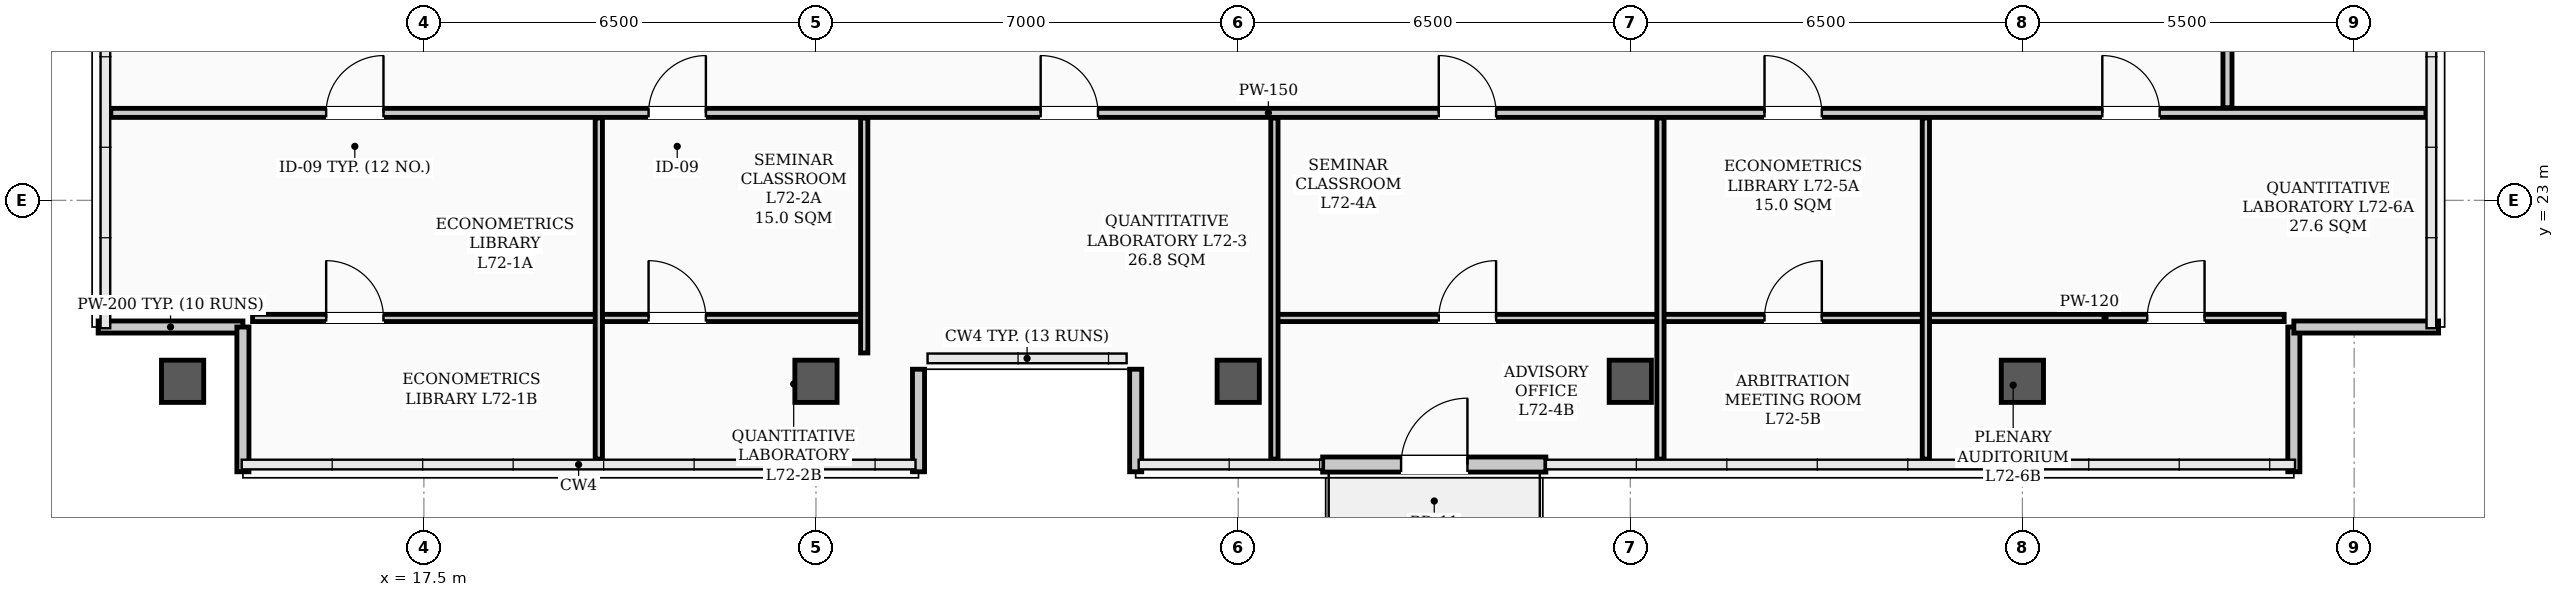
"""IFC4 building model, lengths in metres.
Left out: names, types, materials, properties, quantities, classifications, styles, units other than length and angle.
Written with IfcOpenShell. Run it as: python <this file> out.ifc"""

import sys

from ifc_helpers import new_model, si_unit, direction, frame, frame_2d, origin, origin_2d, place, context, subcontext, project, spatial, rectangle, hollow_rectangle, extrude, element, fill, save


model = new_model("IFC4")
c1 = context("Model", 3, precision=1e-05, world=origin(), true_north=direction((0.0, 1.0)))
c2 = subcontext(c1, "Body", "Model", "MODEL_VIEW")
j1 = project(units=[si_unit("LENGTHUNIT", "METRE"), si_unit("PLANEANGLEUNIT", "RADIAN")], contexts=[c1])
p1 = place(None, origin())
s1 = spatial("IfcSite", under=j1, at=p1, CompositionType="ELEMENT")
p2 = place(p1, origin())
s2 = spatial("IfcBuilding", under=s1, at=p2, CompositionType="ELEMENT")
p3 = place(p2, frame((0.0, 0.0, 289.1)))
s3 = spatial("IfcBuildingStorey", under=s2, at=p3, CompositionType="ELEMENT", Elevation=289.1)
for number, where, z_axis, x_axis in (
    (1, (13.5, 20.0, 0.0), (0.0, 0.0, 1.0), (1.0, 0.0, 0.0)),
    (2, (24.0, 20.0, 0.0), (0.0, 0.0, 1.0), (1.0, 0.0, 0.0)),
    (3, (31.0, 20.0, 0.0), (0.0, 0.0, 1.0), (1.0, 0.0, 0.0)),
    (4, (37.5, 20.0, 0.0), (0.0, 0.0, 1.0), (1.0, 0.0, 0.0)),
    (5, (44.0, 20.0, 0.0), (0.0, 0.0, 1.0), (1.0, 0.0, 0.0)),
):
    element("IfcColumn", number, at=place(p3, frame(where, z_axis=z_axis, x_axis=x_axis)), inside=s3, PredefinedType="COLUMN", context=c2, shape_type="SweptSolid", body=[
        extrude(hollow_rectangle(XDim=0.7, YDim=0.7, WallThickness=0.028, InnerFilletRadius=0.014, OuterFilletRadius=0.042, at=origin_2d()), origin(), (0.0, 0.0, 1.0), 3.9),
    ])
for number, where, z_axis, x_axis in (
    (6, (12.1, 20.9, 0.0), (0.0, 0.0, 1.0), (1.0, 0.0, 0.0)),
    (7, (14.5, 20.9, 0.0), (0.0, 0.0, 1.0), (0.0, -1.0, 0.0)),
    (8, (48.5, 18.5, 0.0), (0.0, 0.0, 1.0), (0.0, 1.0, 0.0)),
    (9, (48.5, 20.9, 0.0), (0.0, 0.0, 1.0), (1.0, 0.0, 0.0)),
):
    element("IfcWall", number, at=place(p3, frame(where, z_axis=z_axis, x_axis=x_axis)), inside=s3, PredefinedType="PARAPET", context=c2, shape_type="SweptSolid", body=[
        extrude(rectangle(XDim=2.4, YDim=0.2, at=frame_2d((1.2, 0.0))), origin(), (0.0, 0.0, 1.0), 1.2),
    ])
for number, where, z_axis, x_axis in (
    (10, (25.7, 18.5, 0.0), (0.0, 0.0, 1.0), (0.0, 1.0, 0.0)),
    (11, (29.3, 20.2, 0.0), (0.0, 0.0, 1.0), (0.0, -1.0, 0.0)),
):
    element("IfcWall", number, at=place(p3, frame(where, z_axis=z_axis, x_axis=x_axis)), inside=s3, PredefinedType="PARAPET", context=c2, shape_type="SweptSolid", body=[
        extrude(rectangle(XDim=1.7, YDim=0.2, at=frame_2d((0.85, 0.0))), origin(), (0.0, 0.0, 1.0), 1.2),
    ])
p4 = place(p3, frame((32.4, 18.62, 0.0), z_axis=(0.0, 0.0, 1.0), x_axis=(1.0, 0.0, 0.0)))
e12 = element("IfcWall", 12, at=p4, inside=s3, PredefinedType="STANDARD", context=c2, shape_type="SweptSolid", body=[
    extrude(rectangle(XDim=3.7, YDim=0.25, at=frame_2d((1.85, 0.0))), origin(), (0.0, 0.0, 1.0), 3.18),
])
p5 = place(p4, frame((1.3, 0.0, 0.0)))
e13 = element("IfcOpeningElement", 13, at=p5, cuts=e12, PredefinedType="OPENING", context=c2, shape_type="SweptSolid", body=[
    extrude(rectangle(XDim=1.1, YDim=2.2, at=frame_2d((0.55, 1.1))), frame((0.0, 0.135, 0.0), z_axis=(0.0, -1.0, 0.0), x_axis=(1.0, 0.0, 0.0)), (0.0, 0.0, 1.0), 0.27),
])
p6 = place(p3, frame((12.31, 24.45, 0.0), z_axis=(0.0, 0.0, 1.0), x_axis=(1.0, 0.0, 0.0)))
e14 = element("IfcWall", 14, at=p6, inside=s3, PredefinedType="PARTITIONING", context=c2, shape_type="SweptSolid", body=[
    extrude(rectangle(XDim=38.38, YDim=0.15, at=frame_2d((19.19, 0.0))), origin(), (0.0, 0.0, 1.0), 3.2),
])
p7 = place(p6, frame((3.57, 0.0, 0.0)))
e15 = element("IfcOpeningElement", 15, at=p7, cuts=e14, PredefinedType="OPENING", context=c2, shape_type="SweptSolid", body=[
    extrude(rectangle(XDim=0.95, YDim=2.08, at=frame_2d((0.475, 1.04))), frame((0.0, 0.085, 0.0), z_axis=(0.0, -1.0, 0.0), x_axis=(1.0, 0.0, 0.0)), (0.0, 0.0, 1.0), 0.17),
])
p8 = place(p6, frame((8.915, 0.0, 0.0)))
e16 = element("IfcOpeningElement", 16, at=p8, cuts=e14, PredefinedType="OPENING", context=c2, shape_type="SweptSolid", body=[
    extrude(rectangle(XDim=0.95, YDim=2.08, at=frame_2d((0.475, 1.04))), frame((0.0, 0.085, 0.0), z_axis=(0.0, -1.0, 0.0), x_axis=(1.0, 0.0, 0.0)), (0.0, 0.0, 1.0), 0.17),
])
p9 = place(p6, frame((15.415, 0.0, 0.0)))
e17 = element("IfcOpeningElement", 17, at=p9, cuts=e14, PredefinedType="OPENING", context=c2, shape_type="SweptSolid", body=[
    extrude(rectangle(XDim=0.95, YDim=2.08, at=frame_2d((0.475, 1.04))), frame((0.0, 0.085, 0.0), z_axis=(0.0, -1.0, 0.0), x_axis=(1.0, 0.0, 0.0)), (0.0, 0.0, 1.0), 0.17),
])
p10 = place(p6, frame((22.015, 0.0, 0.0)))
e18 = element("IfcOpeningElement", 18, at=p10, cuts=e14, PredefinedType="OPENING", context=c2, shape_type="SweptSolid", body=[
    extrude(rectangle(XDim=0.95, YDim=2.08, at=frame_2d((0.475, 1.04))), frame((0.0, 0.085, 0.0), z_axis=(0.0, -1.0, 0.0), x_axis=(1.0, 0.0, 0.0)), (0.0, 0.0, 1.0), 0.17),
])
p11 = place(p6, frame((27.415, 0.0, 0.0)))
e19 = element("IfcOpeningElement", 19, at=p11, cuts=e14, PredefinedType="OPENING", context=c2, shape_type="SweptSolid", body=[
    extrude(rectangle(XDim=0.95, YDim=2.08, at=frame_2d((0.475, 1.04))), frame((0.0, 0.085, 0.0), z_axis=(0.0, -1.0, 0.0), x_axis=(1.0, 0.0, 0.0)), (0.0, 0.0, 1.0), 0.17),
])
p12 = place(p6, frame((33.015, 0.0, 0.0)))
e20 = element("IfcOpeningElement", 20, at=p12, cuts=e14, PredefinedType="OPENING", context=c2, shape_type="SweptSolid", body=[
    extrude(rectangle(XDim=0.95, YDim=2.08, at=frame_2d((0.475, 1.04))), frame((0.0, 0.085, 0.0), z_axis=(0.0, -1.0, 0.0), x_axis=(1.0, 0.0, 0.0)), (0.0, 0.0, 1.0), 0.17),
])
p13 = place(p3, frame((14.66, 21.05, 0.0), z_axis=(0.0, 0.0, 1.0), x_axis=(1.0, 0.0, 0.0)))
e21 = element("IfcWall", 21, at=p13, inside=s3, PredefinedType="PARTITIONING", context=c2, shape_type="SweptSolid", body=[
    extrude(rectangle(XDim=5.74, YDim=0.12, at=frame_2d((2.87, 0.0))), origin(), (0.0, 0.0, 1.0), 3.72),
])
p14 = place(p13, frame((1.22, 0.0, 0.0)))
e22 = element("IfcOpeningElement", 22, at=p14, cuts=e21, PredefinedType="OPENING", context=c2, shape_type="SweptSolid", body=[
    extrude(rectangle(XDim=0.95, YDim=2.08, at=frame_2d((0.475, 1.04))), frame((0.0, 0.07, 0.0), z_axis=(0.0, -1.0, 0.0), x_axis=(1.0, 0.0, 0.0)), (0.0, 0.0, 1.0), 0.14),
])
p15 = place(p3, frame((20.4, 21.05, 0.0), z_axis=(0.0, 0.0, 1.0), x_axis=(1.0, 0.0, 0.0)))
e23 = element("IfcWall", 23, at=p15, inside=s3, PredefinedType="PARTITIONING", context=c2, shape_type="SweptSolid", body=[
    extrude(rectangle(XDim=4.4, YDim=0.12, at=frame_2d((2.2, 0.0))), origin(), (0.0, 0.0, 1.0), 3.2),
])
p16 = place(p15, frame((0.825, 0.0, 0.0)))
e24 = element("IfcOpeningElement", 24, at=p16, cuts=e23, PredefinedType="OPENING", context=c2, shape_type="SweptSolid", body=[
    extrude(rectangle(XDim=0.95, YDim=2.08, at=frame_2d((0.475, 1.04))), frame((0.0, 0.07, 0.0), z_axis=(0.0, -1.0, 0.0), x_axis=(1.0, 0.0, 0.0)), (0.0, 0.0, 1.0), 0.14),
])
p17 = place(p3, frame((31.6, 21.05, 0.0), z_axis=(0.0, 0.0, 1.0), x_axis=(1.0, 0.0, 0.0)))
e25 = element("IfcWall", 25, at=p17, inside=s3, PredefinedType="PARTITIONING", context=c2, shape_type="SweptSolid", body=[
    extrude(rectangle(XDim=6.4, YDim=0.12, at=frame_2d((3.2, 0.0))), origin(), (0.0, 0.0, 1.0), 3.2),
])
p18 = place(p17, frame((2.725, 0.0, 0.0)))
e26 = element("IfcOpeningElement", 26, at=p18, cuts=e25, PredefinedType="OPENING", context=c2, shape_type="SweptSolid", body=[
    extrude(rectangle(XDim=0.95, YDim=2.08, at=frame_2d((0.475, 1.04))), frame((0.0, 0.07, 0.0), z_axis=(0.0, -1.0, 0.0), x_axis=(1.0, 0.0, 0.0)), (0.0, 0.0, 1.0), 0.14),
])
p19 = place(p3, frame((38.0, 21.05, 0.0), z_axis=(0.0, 0.0, 1.0), x_axis=(1.0, 0.0, 0.0)))
e27 = element("IfcWall", 27, at=p19, inside=s3, PredefinedType="PARTITIONING", context=c2, shape_type="SweptSolid", body=[
    extrude(rectangle(XDim=4.4, YDim=0.12, at=frame_2d((2.2, 0.0))), origin(), (0.0, 0.0, 1.0), 3.2),
])
p20 = place(p19, frame((1.725, 0.0, 0.0)))
e28 = element("IfcOpeningElement", 28, at=p20, cuts=e27, PredefinedType="OPENING", context=c2, shape_type="SweptSolid", body=[
    extrude(rectangle(XDim=0.95, YDim=2.08, at=frame_2d((0.475, 1.04))), frame((0.0, 0.07, 0.0), z_axis=(0.0, -1.0, 0.0), x_axis=(1.0, 0.0, 0.0)), (0.0, 0.0, 1.0), 0.14),
])
p21 = place(p3, frame((42.4, 21.05, 0.0), z_axis=(0.0, 0.0, 1.0), x_axis=(1.0, 0.0, 0.0)))
e29 = element("IfcWall", 29, at=p21, inside=s3, PredefinedType="PARTITIONING", context=c2, shape_type="SweptSolid", body=[
    extrude(rectangle(XDim=5.94, YDim=0.12, at=frame_2d((2.97, 0.0))), origin(), (0.0, 0.0, 1.0), 3.2),
])
p22 = place(p21, frame((3.67, 0.0, 0.0)))
e30 = element("IfcOpeningElement", 30, at=p22, cuts=e29, PredefinedType="OPENING", context=c2, shape_type="SweptSolid", body=[
    extrude(rectangle(XDim=0.95, YDim=2.08, at=frame_2d((0.475, 1.04))), frame((0.0, 0.07, 0.0), z_axis=(0.0, -1.0, 0.0), x_axis=(1.0, 0.0, 0.0)), (0.0, 0.0, 1.0), 0.14),
])
p23 = place(p3, frame((47.4, 24.535, 0.0), z_axis=(0.0, 0.0, 1.0), x_axis=(0.0, 1.0, 0.0)))
e31 = element("IfcWall", 31, at=p23, inside=s3, PredefinedType="PARTITIONING", context=c2, shape_type="SweptSolid", body=[
    extrude(rectangle(XDim=17.13, YDim=0.15, at=frame_2d((8.565, 0.0))), origin(), (0.0, 0.0, 1.0), 3.1),
])
p24 = place(p23, frame((8.09, 0.0, 0.0)))
e32 = element("IfcOpeningElement", 32, at=p24, cuts=e31, PredefinedType="OPENING", context=c2, shape_type="SweptSolid", body=[
    extrude(rectangle(XDim=0.95, YDim=2.08, at=frame_2d((0.475, 1.04))), frame((0.0, 0.085, 0.0), z_axis=(0.0, -1.0, 0.0), x_axis=(1.0, 0.0, 0.0)), (0.0, 0.0, 1.0), 0.17),
])
p25 = place(p3, frame((20.4, 18.71, 0.0), z_axis=(0.0, 0.0, 1.0), x_axis=(0.0, 1.0, 0.0)))
e33 = element("IfcWall", 33, at=p25, inside=s3, PredefinedType="PARTITIONING", context=c2, shape_type="SweptSolid", body=[
    extrude(rectangle(XDim=5.655, YDim=0.12, at=frame_2d((2.828, 0.0))), origin(), (0.0, 0.0, 1.0), 3.72),
])
p26 = place(p3, frame((24.8, 20.47, 0.0), z_axis=(0.0, 0.0, 1.0), x_axis=(0.0, 1.0, 0.0)))
e34 = element("IfcWall", 34, at=p26, inside=s3, PredefinedType="PARTITIONING", context=c2, shape_type="SweptSolid", body=[
    extrude(rectangle(XDim=3.895, YDim=0.12, at=frame_2d((1.948, 0.0))), origin(), (0.0, 0.0, 1.0), 3.1),
])
for number, where, z_axis, x_axis in (
    (35, (31.6, 18.71, 0.0), (0.0, 0.0, 1.0), (0.0, 1.0, 0.0)),
    (36, (38.0, 18.71, 0.0), (0.0, 0.0, 1.0), (0.0, 1.0, 0.0)),
    (37, (42.4, 18.71, 0.0), (0.0, 0.0, 1.0), (0.0, 1.0, 0.0)),
):
    element("IfcWall", number, at=place(p3, frame(where, z_axis=z_axis, x_axis=x_axis)), inside=s3, PredefinedType="PARTITIONING", context=c2, shape_type="SweptSolid", body=[
        extrude(rectangle(XDim=5.655, YDim=0.12, at=frame_2d((2.828, 0.0))), origin(), (0.0, 0.0, 1.0), 3.1),
    ])
p27 = place(p5, origin())
e38 = element("IfcDoor", 38, at=p27, inside=s3, OperationType="SINGLE_SWING_RIGHT", PredefinedType="DOOR", context=c2, shape_type="SweptSolid", body=[
    extrude(rectangle(XDim=1.1, YDim=2.2, at=frame_2d((0.55, 1.1))), frame((0.0, 0.025, 0.0), z_axis=(0.0, -1.0, 0.0), x_axis=(1.0, 0.0, 0.0)), (0.0, 0.0, 1.0), 0.05),
])
fill(e13, e38)
p28 = place(p14, origin())
e39 = element("IfcDoor", 39, at=p28, inside=s3, OperationType="SINGLE_SWING_LEFT", PredefinedType="DOOR", context=c2, shape_type="SweptSolid", body=[
    extrude(rectangle(XDim=0.95, YDim=2.08, at=frame_2d((0.475, 1.04))), frame((0.0, 0.025, 0.0), z_axis=(0.0, -1.0, 0.0), x_axis=(1.0, 0.0, 0.0)), (0.0, 0.0, 1.0), 0.05),
])
fill(e22, e39)
p29 = place(p7, origin())
e40 = element("IfcDoor", 40, at=p29, inside=s3, OperationType="SINGLE_SWING_RIGHT", PredefinedType="DOOR", context=c2, shape_type="SweptSolid", body=[
    extrude(rectangle(XDim=0.95, YDim=2.08, at=frame_2d((0.475, 1.04))), frame((0.0, 0.025, 0.0), z_axis=(0.0, -1.0, 0.0), x_axis=(1.0, 0.0, 0.0)), (0.0, 0.0, 1.0), 0.05),
])
fill(e15, e40)
p30 = place(p16, origin())
e41 = element("IfcDoor", 41, at=p30, inside=s3, OperationType="SINGLE_SWING_LEFT", PredefinedType="DOOR", context=c2, shape_type="SweptSolid", body=[
    extrude(rectangle(XDim=0.95, YDim=2.08, at=frame_2d((0.475, 1.04))), frame((0.0, 0.025, 0.0), z_axis=(0.0, -1.0, 0.0), x_axis=(1.0, 0.0, 0.0)), (0.0, 0.0, 1.0), 0.05),
])
fill(e24, e41)
p31 = place(p8, origin())
e42 = element("IfcDoor", 42, at=p31, inside=s3, OperationType="SINGLE_SWING_RIGHT", PredefinedType="DOOR", context=c2, shape_type="SweptSolid", body=[
    extrude(rectangle(XDim=0.95, YDim=2.08, at=frame_2d((0.475, 1.04))), frame((0.0, 0.025, 0.0), z_axis=(0.0, -1.0, 0.0), x_axis=(1.0, 0.0, 0.0)), (0.0, 0.0, 1.0), 0.05),
])
fill(e16, e42)
p32 = place(p9, origin())
e43 = element("IfcDoor", 43, at=p32, inside=s3, OperationType="SINGLE_SWING_LEFT", PredefinedType="DOOR", context=c2, shape_type="SweptSolid", body=[
    extrude(rectangle(XDim=0.95, YDim=2.08, at=frame_2d((0.475, 1.04))), frame((0.0, 0.025, 0.0), z_axis=(0.0, -1.0, 0.0), x_axis=(1.0, 0.0, 0.0)), (0.0, 0.0, 1.0), 0.05),
])
fill(e17, e43)
p33 = place(p18, origin())
e44 = element("IfcDoor", 44, at=p33, inside=s3, OperationType="SINGLE_SWING_RIGHT", PredefinedType="DOOR", context=c2, shape_type="SweptSolid", body=[
    extrude(rectangle(XDim=0.95, YDim=2.08, at=frame_2d((0.475, 1.04))), frame((0.0, 0.025, 0.0), z_axis=(0.0, -1.0, 0.0), x_axis=(1.0, 0.0, 0.0)), (0.0, 0.0, 1.0), 0.05),
])
fill(e26, e44)
p34 = place(p10, origin())
e45 = element("IfcDoor", 45, at=p34, inside=s3, OperationType="SINGLE_SWING_LEFT", PredefinedType="DOOR", context=c2, shape_type="SweptSolid", body=[
    extrude(rectangle(XDim=0.95, YDim=2.08, at=frame_2d((0.475, 1.04))), frame((0.0, 0.025, 0.0), z_axis=(0.0, -1.0, 0.0), x_axis=(1.0, 0.0, 0.0)), (0.0, 0.0, 1.0), 0.05),
])
fill(e18, e45)
p35 = place(p20, origin())
e46 = element("IfcDoor", 46, at=p35, inside=s3, OperationType="SINGLE_SWING_RIGHT", PredefinedType="DOOR", context=c2, shape_type="SweptSolid", body=[
    extrude(rectangle(XDim=0.95, YDim=2.08, at=frame_2d((0.475, 1.04))), frame((0.0, 0.025, 0.0), z_axis=(0.0, -1.0, 0.0), x_axis=(1.0, 0.0, 0.0)), (0.0, 0.0, 1.0), 0.05),
])
fill(e28, e46)
p36 = place(p11, origin())
e47 = element("IfcDoor", 47, at=p36, inside=s3, OperationType="SINGLE_SWING_LEFT", PredefinedType="DOOR", context=c2, shape_type="SweptSolid", body=[
    extrude(rectangle(XDim=0.95, YDim=2.08, at=frame_2d((0.475, 1.04))), frame((0.0, 0.025, 0.0), z_axis=(0.0, -1.0, 0.0), x_axis=(1.0, 0.0, 0.0)), (0.0, 0.0, 1.0), 0.05),
])
fill(e19, e47)
p37 = place(p22, origin())
e48 = element("IfcDoor", 48, at=p37, inside=s3, OperationType="SINGLE_SWING_RIGHT", PredefinedType="DOOR", context=c2, shape_type="SweptSolid", body=[
    extrude(rectangle(XDim=0.95, YDim=2.08, at=frame_2d((0.475, 1.04))), frame((0.0, 0.025, 0.0), z_axis=(0.0, -1.0, 0.0), x_axis=(1.0, 0.0, 0.0)), (0.0, 0.0, 1.0), 0.05),
])
fill(e30, e48)
p38 = place(p12, origin())
e49 = element("IfcDoor", 49, at=p38, inside=s3, OperationType="SINGLE_SWING_LEFT", PredefinedType="DOOR", context=c2, shape_type="SweptSolid", body=[
    extrude(rectangle(XDim=0.95, YDim=2.08, at=frame_2d((0.475, 1.04))), frame((0.0, 0.025, 0.0), z_axis=(0.0, -1.0, 0.0), x_axis=(1.0, 0.0, 0.0)), (0.0, 0.0, 1.0), 0.05),
])
fill(e20, e49)
save(model, sys.argv[1])
